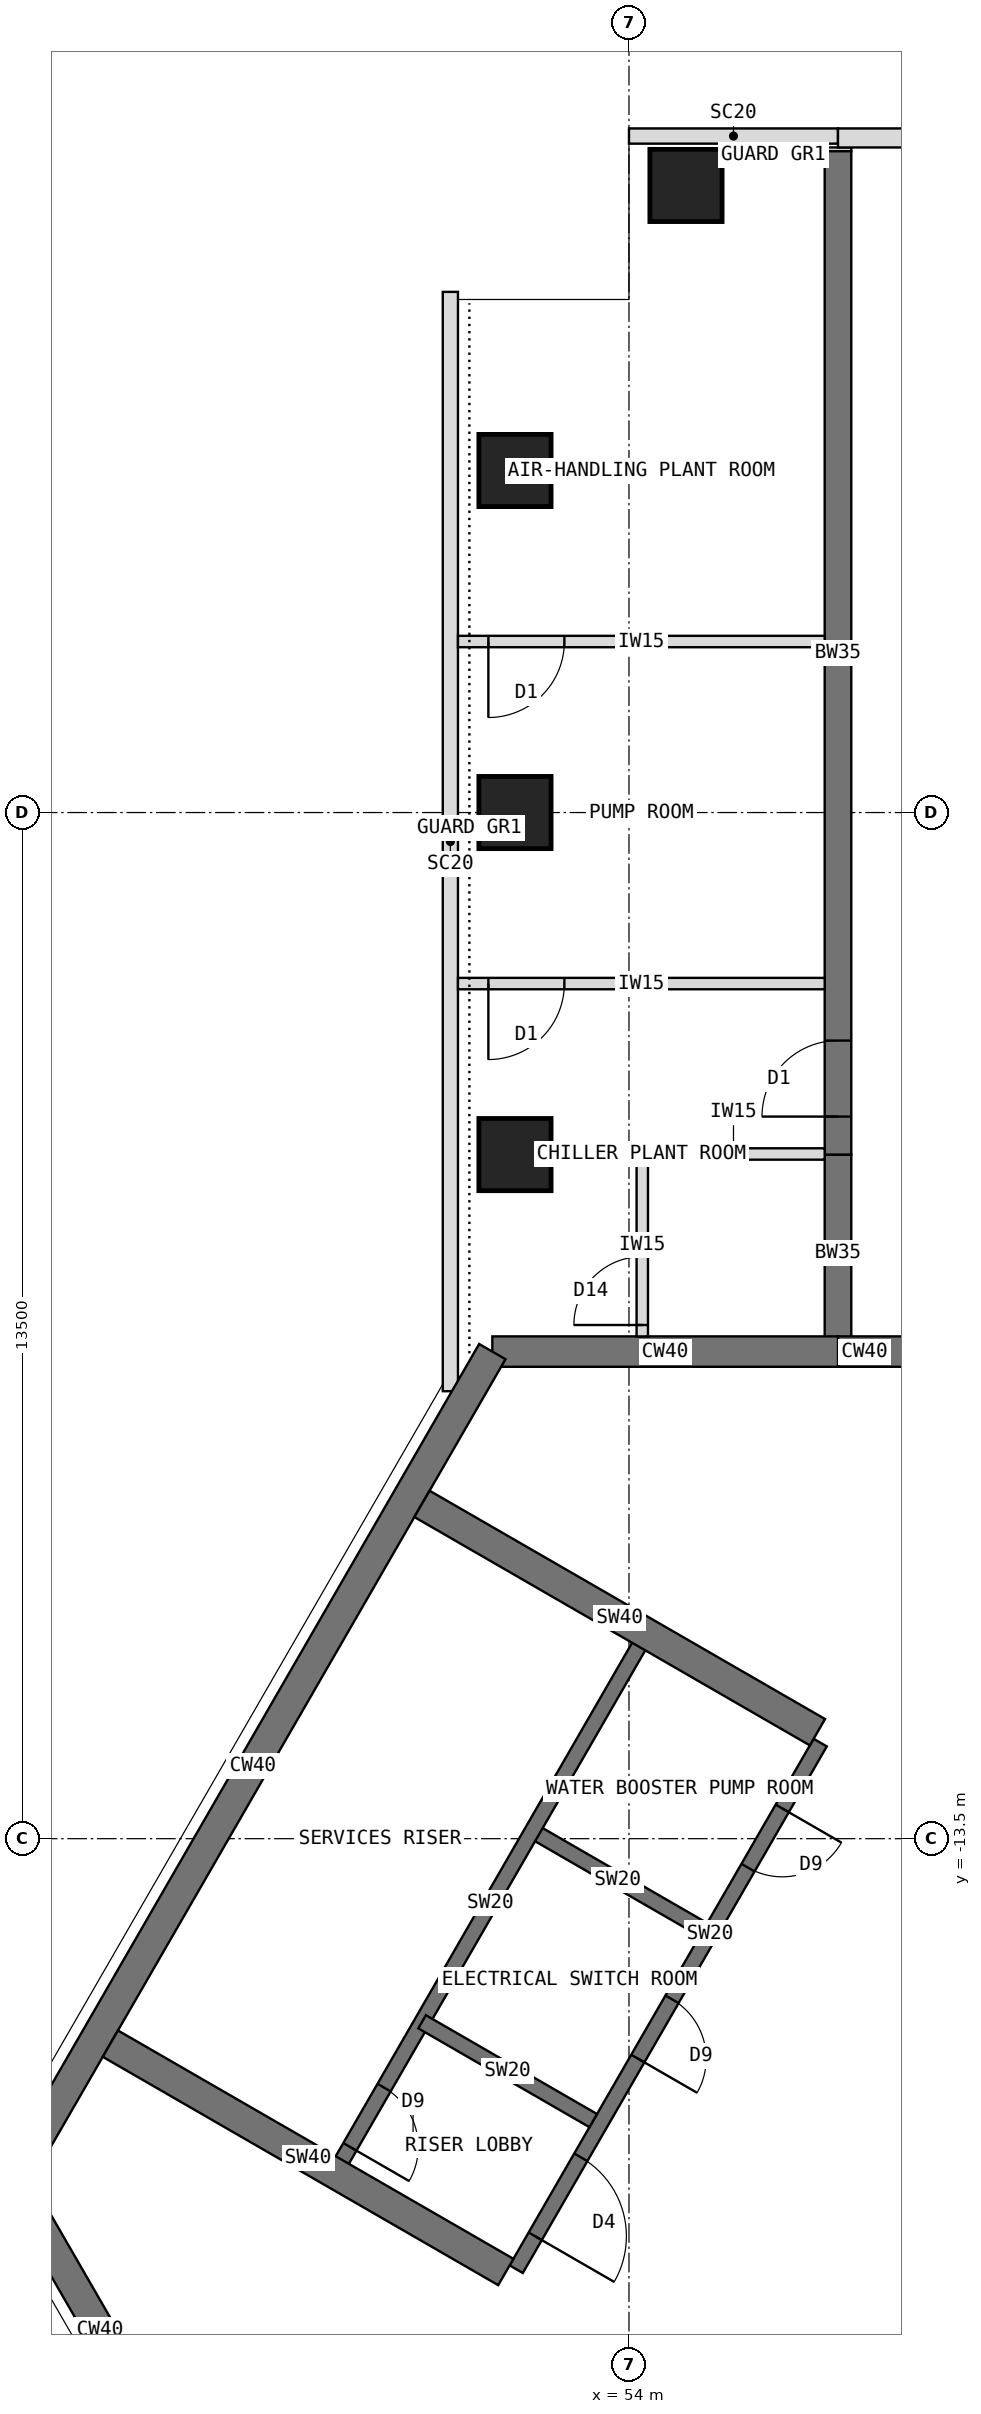
"""IFC4 building model, lengths in metres.
Left out: names, types, materials, properties, quantities, classifications, styles, units other than length and angle.
Written with IfcOpenShell. Run it as: python <this file> out.ifc"""

import sys

from ifc_helpers import new_model, si_unit, direction, frame, frame_2d, origin, origin_2d, place, context, subcontext, project, spatial, rectangle, extrude, element, fill, save


model = new_model("IFC4")
c1 = context("Model", 3, precision=1e-05, world=origin(), true_north=direction((0.0, 1.0)))
c2 = subcontext(c1, "Body", "Model", "MODEL_VIEW")
j1 = project(units=[si_unit("LENGTHUNIT", "METRE"), si_unit("PLANEANGLEUNIT", "RADIAN")], contexts=[c1])
p1 = place(None, origin())
s1 = spatial("IfcSite", under=j1, at=p1, CompositionType="ELEMENT")
p2 = place(p1, origin())
s2 = spatial("IfcBuilding", under=s1, at=p2, CompositionType="ELEMENT")
p3 = place(p2, frame((0.0, 0.0, 291.5)))
s3 = spatial("IfcBuildingStorey", under=s2, at=p3, CompositionType="ELEMENT", Elevation=291.5)
p4 = place(p3, frame((60.25, -7.092, 0.0), z_axis=(0.0, 0.0, 1.0), x_axis=(-1.0, 0.0, 0.0)))
e1 = element("IfcWall", 1, at=p4, inside=s3, PredefinedType="SHEAR", context=c2, shape_type="SweptSolid", body=[
    extrude(rectangle(XDim=3.5, YDim=0.4, at=frame_2d((1.75, 0.0))), origin(), (0.0, 0.0, 1.0), 4.55),
])
p5 = place(p4, frame((0.85, 0.0, 0.0)))
e2 = element("IfcOpeningElement", 2, at=p5, cuts=e1, PredefinedType="OPENING", context=c2, shape_type="SweptSolid", body=[
    extrude(rectangle(XDim=1.8, YDim=2.1, at=frame_2d((0.9, 1.05))), frame((0.0, 0.21, 0.0), z_axis=(0.0, -1.0, 0.0), x_axis=(1.0, 0.0, 0.0)), (0.0, 0.0, 1.0), 0.42),
])
p6 = place(p3, frame((56.75, -7.092, 0.0), z_axis=(0.0, 0.0, 1.0), x_axis=(-1.0, 0.0, 0.0)))
e3 = element("IfcWall", 3, at=p6, inside=s3, PredefinedType="SHEAR", context=c2, shape_type="SweptSolid", body=[
    extrude(rectangle(XDim=4.548, YDim=0.4, at=frame_2d((2.274, 0.0))), origin(), (0.0, 0.0, 1.0), 4.55),
])
p7 = place(p3, frame((52.202, -7.092, 0.0), z_axis=(0.0, 0.0, 1.0), x_axis=(-0.500005998175, -0.866021940709, 0.0)))
e4 = element("IfcWall", 4, at=p7, inside=s3, PredefinedType="SHEAR", context=c2, shape_type="SweptSolid", body=[
    extrude(rectangle(XDim=12.596, YDim=0.4, at=frame_2d((6.298, 0.0))), origin(), (0.0, 0.0, 1.0), 4.55),
])
p8 = place(p3, frame((45.904, -18.0, 0.0), z_axis=(0.0, 0.0, 1.0), x_axis=(0.500024481964, -0.866011268655, 0.0)))
e5 = element("IfcWall", 5, at=p8, inside=s3, PredefinedType="SHEAR", context=c2, shape_type="SweptSolid", body=[
    extrude(rectangle(XDim=4.548, YDim=0.4, at=frame_2d((2.274, 0.0))), origin(), (0.0, 0.0, 1.0), 4.55),
])
p9 = place(p3, frame((56.75, -7.092, 0.0), z_axis=(0.0, 0.0, 1.0), x_axis=(0.0, 1.0, 0.0)))
e6 = element("IfcWall", 6, at=p9, inside=s3, PredefinedType="SHEAR", context=c2, shape_type="SweptSolid", body=[
    extrude(rectangle(XDim=2.592, YDim=0.35, at=frame_2d((1.296, 0.0))), origin(), (0.0, 0.0, 1.0), 4.55),
])
p10 = place(p3, frame((56.75, -4.5, 0.0), z_axis=(0.0, 0.0, 1.0), x_axis=(0.0, 1.0, 0.0)))
e7 = element("IfcWall", 7, at=p10, inside=s3, PredefinedType="SHEAR", context=c2, shape_type="SweptSolid", body=[
    extrude(rectangle(XDim=13.2, YDim=0.35, at=frame_2d((6.6, 0.0))), origin(), (0.0, 0.0, 1.0), 4.55),
])
p11 = place(p10, frame((0.5, 0.0, 0.0)))
e8 = element("IfcOpeningElement", 8, at=p11, cuts=e7, PredefinedType="OPENING", context=c2, shape_type="SweptSolid", body=[
    extrude(rectangle(XDim=1.0, YDim=2.1, at=frame_2d((0.5, 1.05))), frame((0.0, 0.185, 0.0), z_axis=(0.0, -1.0, 0.0), x_axis=(1.0, 0.0, 0.0)), (0.0, 0.0, 1.0), 0.37),
])
for number, where, z_axis, x_axis in (
    (9, (52.5, -4.5, 0.0), (0.0, 0.0, 1.0), (1.0, 0.0, 0.0)),
    (10, (52.5, 0.0, 0.0), (0.0, 0.0, 1.0), (1.0, 0.0, 0.0)),
    (11, (52.5, 4.5, 0.0), (0.0, 0.0, 1.0), (1.0, 0.0, 0.0)),
    (12, (54.75, 8.25, 0.0), (0.0, 0.0, 1.0), (1.0, 0.0, 0.0)),
):
    element("IfcColumn", number, at=place(p3, frame(where, z_axis=z_axis, x_axis=x_axis)), inside=s3, PredefinedType="COLUMN", context=c2, shape_type="SweptSolid", body=[
        extrude(rectangle(XDim=0.95, YDim=0.95, at=origin_2d()), origin(), (0.0, 0.0, 1.0), 5.0),
    ])
p12 = place(p3, frame((51.65, -7.613, 0.0), z_axis=(0.0, 0.0, 1.0), x_axis=(0.0, 1.0, 0.0)))
e13 = element("IfcWall", 13, at=p12, inside=s3, PredefinedType="USERDEFINED", context=c2, shape_type="SweptSolid", body=[
    extrude(rectangle(XDim=14.463, YDim=0.2, at=frame_2d((7.231, 0.0))), origin(), (0.0, 0.0, 1.0), 4.55),
])
p13 = place(p3, frame((60.25, 8.875, 0.0), z_axis=(0.0, 0.0, 1.0), x_axis=(-1.0, 0.0, 0.0)))
e14 = element("IfcWall", 14, at=p13, inside=s3, PredefinedType="STANDARD", context=c2, shape_type="SweptSolid", body=[
    extrude(rectangle(XDim=3.5, YDim=0.25, at=frame_2d((1.75, 0.0))), origin(), (0.0, 0.0, 1.0), 4.55),
])
p14 = place(p3, frame((56.75, 8.9, 0.0), z_axis=(0.0, 0.0, 1.0), x_axis=(-1.0, 0.0, 0.0)))
e15 = element("IfcWall", 15, at=p14, inside=s3, PredefinedType="USERDEFINED", context=c2, shape_type="SweptSolid", body=[
    extrude(rectangle(XDim=2.75, YDim=0.2, at=frame_2d((1.375, 0.0))), origin(), (0.0, 0.0, 1.0), 4.55),
])
p15 = place(p3, frame((56.75, 8.7, 0.0), z_axis=(0.0, 0.0, 1.0), x_axis=(0.0, 1.0, 0.0)))
e16 = element("IfcWall", 16, at=p15, inside=s3, PredefinedType="PARTITIONING", context=c2, shape_type="SweptSolid", body=[
    extrude(rectangle(XDim=0.05, YDim=0.35, at=frame_2d((0.025, 0.0))), origin(), (0.0, 0.0, 1.0), 4.55),
])
p16 = place(p3, frame((56.516, -12.236, 0.0), z_axis=(0.0, 0.0, 1.0), x_axis=(-0.49999894854, -0.866026010844, 0.0)))
e17 = element("IfcWall", 17, at=p16, inside=s3, PredefinedType="SHEAR", context=c2, shape_type="SweptSolid", body=[
    extrude(rectangle(XDim=8.0, YDim=0.2, at=frame_2d((4.0, 0.0))), origin(), (0.0, 0.0, 1.0), 4.55),
])
p17 = place(p16, frame((6.3, 0.0, 0.0)))
e18 = element("IfcOpeningElement", 18, at=p17, cuts=e17, PredefinedType="OPENING", context=c2, shape_type="SweptSolid", body=[
    extrude(rectangle(XDim=1.2, YDim=2.1, at=frame_2d((0.6, 1.05))), frame((0.0, 0.11, 0.0), z_axis=(0.0, -1.0, 0.0), x_axis=(1.0, 0.0, 0.0)), (0.0, 0.0, 1.0), 0.22),
])
p18 = place(p16, frame((1.0, 0.0, 0.0)))
e19 = element("IfcOpeningElement", 19, at=p18, cuts=e17, PredefinedType="OPENING", context=c2, shape_type="SweptSolid", body=[
    extrude(rectangle(XDim=0.9, YDim=2.1, at=frame_2d((0.45, 1.05))), frame((0.0, 0.11, 0.0), z_axis=(0.0, -1.0, 0.0), x_axis=(1.0, 0.0, 0.0)), (0.0, 0.0, 1.0), 0.22),
])
p19 = place(p16, frame((3.9, 0.0, 0.0)))
e20 = element("IfcOpeningElement", 20, at=p19, cuts=e17, PredefinedType="OPENING", context=c2, shape_type="SweptSolid", body=[
    extrude(rectangle(XDim=0.9, YDim=2.1, at=frame_2d((0.45, 1.05))), frame((0.0, 0.11, 0.0), z_axis=(0.0, -1.0, 0.0), x_axis=(1.0, 0.0, 0.0)), (0.0, 0.0, 1.0), 0.22),
])
for number, where, z_axis, x_axis in (
    (21, (54.98, -14.697, 0.0), (0.0, 0.0, 1.0), (-0.866, 0.5, 0.0)),
    (22, (53.53, -17.209, 0.0), (0.0, 0.0, 1.0), (-0.866, 0.5, 0.0)),
):
    element("IfcWall", number, at=place(p3, frame(where, z_axis=z_axis, x_axis=x_axis)), inside=s3, PredefinedType="SHEAR", context=c2, shape_type="SweptSolid", body=[
        extrude(rectangle(XDim=2.6, YDim=0.2, at=frame_2d((1.3, 0.0))), origin(), (0.0, 0.0, 1.0), 4.55),
    ])
p20 = place(p3, frame((54.178, -10.886, 0.0), z_axis=(0.0, 0.0, 1.0), x_axis=(-0.49999894854, -0.866026010844, 0.0)))
e23 = element("IfcWall", 23, at=p20, inside=s3, PredefinedType="SHEAR", context=c2, shape_type="SweptSolid", body=[
    extrude(rectangle(XDim=8.0, YDim=0.2, at=frame_2d((4.0, 0.0))), origin(), (0.0, 0.0, 1.0), 4.55),
])
p21 = place(p20, frame((6.8, 0.0, 0.0)))
e24 = element("IfcOpeningElement", 24, at=p21, cuts=e23, PredefinedType="OPENING", context=c2, shape_type="SweptSolid", body=[
    extrude(rectangle(XDim=0.9, YDim=2.1, at=frame_2d((0.45, 1.05))), frame((0.0, 0.11, 0.0), z_axis=(0.0, -1.0, 0.0), x_axis=(1.0, 0.0, 0.0)), (0.0, 0.0, 1.0), 0.22),
])
for number, where, z_axis, x_axis in (
    (25, (52.38, -19.201, 0.0), (0.0, 0.0, 1.0), (-0.866, 0.5, 0.0)),
    (26, (56.48, -12.099, 0.0), (0.0, 0.0, 1.0), (-0.866, 0.5, 0.0)),
):
    element("IfcWall", number, at=place(p3, frame(where, z_axis=z_axis, x_axis=x_axis)), inside=s3, PredefinedType="SHEAR", context=c2, shape_type="SweptSolid", body=[
        extrude(rectangle(XDim=6.008, YDim=0.4, at=frame_2d((3.004, 0.0))), origin(), (0.0, 0.0, 1.0), 4.55),
    ])
p22 = place(p3, frame((56.575, -2.25, 0.0), z_axis=(0.0, 0.0, 1.0), x_axis=(-1.0, 0.0, 0.0)))
e27 = element("IfcWall", 27, at=p22, inside=s3, PredefinedType="PARTITIONING", context=c2, shape_type="SweptSolid", body=[
    extrude(rectangle(XDim=4.825, YDim=0.15, at=frame_2d((2.413, 0.0))), origin(), (0.0, 0.0, 1.0), 4.55),
])
p23 = place(p22, frame((3.425, 0.0, 0.0)))
e28 = element("IfcOpeningElement", 28, at=p23, cuts=e27, PredefinedType="OPENING", context=c2, shape_type="SweptSolid", body=[
    extrude(rectangle(XDim=1.0, YDim=2.1, at=frame_2d((0.5, 1.05))), frame((0.0, 0.085, 0.0), z_axis=(0.0, -1.0, 0.0), x_axis=(1.0, 0.0, 0.0)), (0.0, 0.0, 1.0), 0.17),
])
p24 = place(p3, frame((56.575, 2.25, 0.0), z_axis=(0.0, 0.0, 1.0), x_axis=(-1.0, 0.0, 0.0)))
e29 = element("IfcWall", 29, at=p24, inside=s3, PredefinedType="PARTITIONING", context=c2, shape_type="SweptSolid", body=[
    extrude(rectangle(XDim=4.825, YDim=0.15, at=frame_2d((2.413, 0.0))), origin(), (0.0, 0.0, 1.0), 4.55),
])
p25 = place(p24, frame((3.425, 0.0, 0.0)))
e30 = element("IfcOpeningElement", 30, at=p25, cuts=e29, PredefinedType="OPENING", context=c2, shape_type="SweptSolid", body=[
    extrude(rectangle(XDim=1.0, YDim=2.1, at=frame_2d((0.5, 1.05))), frame((0.0, 0.085, 0.0), z_axis=(0.0, -1.0, 0.0), x_axis=(1.0, 0.0, 0.0)), (0.0, 0.0, 1.0), 0.17),
])
p26 = place(p3, frame((54.175, -6.892, 0.0), z_axis=(0.0, 0.0, 1.0), x_axis=(0.0, 1.0, 0.0)))
e31 = element("IfcWall", 31, at=p26, inside=s3, PredefinedType="PARTITIONING", context=c2, shape_type="SweptSolid", body=[
    extrude(rectangle(XDim=2.4, YDim=0.15, at=frame_2d((1.2, 0.0))), origin(), (0.0, 0.0, 1.0), 4.55),
])
p27 = place(p26, frame((0.15, 0.0, 0.0)))
e32 = element("IfcOpeningElement", 32, at=p27, cuts=e31, PredefinedType="OPENING", context=c2, shape_type="SweptSolid", body=[
    extrude(rectangle(XDim=0.9, YDim=2.1, at=frame_2d((0.45, 1.05))), frame((0.0, 0.085, 0.0), z_axis=(0.0, -1.0, 0.0), x_axis=(1.0, 0.0, 0.0)), (0.0, 0.0, 1.0), 0.17),
])
p28 = place(p3, frame((56.575, -4.492, 0.0), z_axis=(0.0, 0.0, 1.0), x_axis=(-1.0, 0.0, 0.0)))
e33 = element("IfcWall", 33, at=p28, inside=s3, PredefinedType="PARTITIONING", context=c2, shape_type="SweptSolid", body=[
    extrude(rectangle(XDim=2.4, YDim=0.15, at=frame_2d((1.2, 0.0))), origin(), (0.0, 0.0, 1.0), 4.017),
])
p29 = place(p17, origin())
e34 = element("IfcDoor", 34, at=p29, inside=s3, OperationType="SINGLE_SWING_RIGHT", PredefinedType="DOOR", context=c2, shape_type="SweptSolid", body=[
    extrude(rectangle(XDim=1.2, YDim=2.1, at=frame_2d((0.6, 1.05))), frame((0.0, 0.025, 0.0), z_axis=(0.0, -1.0, 0.0), x_axis=(1.0, 0.0, 0.0)), (0.0, 0.0, 1.0), 0.05),
])
fill(e18, e34)
p30 = place(p21, origin())
e35 = element("IfcDoor", 35, at=p30, inside=s3, OperationType="SINGLE_SWING_RIGHT", PredefinedType="DOOR", context=c2, shape_type="SweptSolid", body=[
    extrude(rectangle(XDim=0.9, YDim=2.1, at=frame_2d((0.45, 1.05))), frame((0.0, 0.025, 0.0), z_axis=(0.0, -1.0, 0.0), x_axis=(1.0, 0.0, 0.0)), (0.0, 0.0, 1.0), 0.05),
])
fill(e24, e35)
p31 = place(p23, origin())
e36 = element("IfcDoor", 36, at=p31, inside=s3, OperationType="SINGLE_SWING_RIGHT", PredefinedType="DOOR", context=c2, shape_type="SweptSolid", body=[
    extrude(rectangle(XDim=1.0, YDim=2.1, at=frame_2d((0.5, 1.05))), frame((0.0, 0.025, 0.0), z_axis=(0.0, -1.0, 0.0), x_axis=(1.0, 0.0, 0.0)), (0.0, 0.0, 1.0), 0.05),
])
fill(e28, e36)
p32 = place(p25, origin())
e37 = element("IfcDoor", 37, at=p32, inside=s3, OperationType="SINGLE_SWING_RIGHT", PredefinedType="DOOR", context=c2, shape_type="SweptSolid", body=[
    extrude(rectangle(XDim=1.0, YDim=2.1, at=frame_2d((0.5, 1.05))), frame((0.0, 0.025, 0.0), z_axis=(0.0, -1.0, 0.0), x_axis=(1.0, 0.0, 0.0)), (0.0, 0.0, 1.0), 0.05),
])
fill(e30, e37)
p33 = place(p27, origin())
e38 = element("IfcDoor", 38, at=p33, inside=s3, OperationType="SINGLE_SWING_LEFT", PredefinedType="DOOR", context=c2, shape_type="SweptSolid", body=[
    extrude(rectangle(XDim=0.9, YDim=2.1, at=frame_2d((0.45, 1.05))), frame((0.0, 0.025, 0.0), z_axis=(0.0, -1.0, 0.0), x_axis=(1.0, 0.0, 0.0)), (0.0, 0.0, 1.0), 0.05),
])
fill(e32, e38)
p34 = place(p11, origin())
e39 = element("IfcDoor", 39, at=p34, inside=s3, OperationType="SINGLE_SWING_LEFT", PredefinedType="DOOR", context=c2, shape_type="SweptSolid", body=[
    extrude(rectangle(XDim=1.0, YDim=2.1, at=frame_2d((0.5, 1.05))), frame((0.0, 0.025, 0.0), z_axis=(0.0, -1.0, 0.0), x_axis=(1.0, 0.0, 0.0)), (0.0, 0.0, 1.0), 0.05),
])
fill(e8, e39)
p35 = place(p18, origin())
e40 = element("IfcDoor", 40, at=p35, inside=s3, OperationType="SINGLE_SWING_LEFT", PredefinedType="DOOR", context=c2, shape_type="SweptSolid", body=[
    extrude(rectangle(XDim=0.9, YDim=2.1, at=frame_2d((0.45, 1.05))), frame((0.0, 0.025, 0.0), z_axis=(0.0, -1.0, 0.0), x_axis=(1.0, 0.0, 0.0)), (0.0, 0.0, 1.0), 0.05),
])
fill(e19, e40)
p36 = place(p19, origin())
e41 = element("IfcDoor", 41, at=p36, inside=s3, OperationType="SINGLE_SWING_RIGHT", PredefinedType="DOOR", context=c2, shape_type="SweptSolid", body=[
    extrude(rectangle(XDim=0.9, YDim=2.1, at=frame_2d((0.45, 1.05))), frame((0.0, 0.025, 0.0), z_axis=(0.0, -1.0, 0.0), x_axis=(1.0, 0.0, 0.0)), (0.0, 0.0, 1.0), 0.05),
])
fill(e20, e41)
save(model, sys.argv[1])
